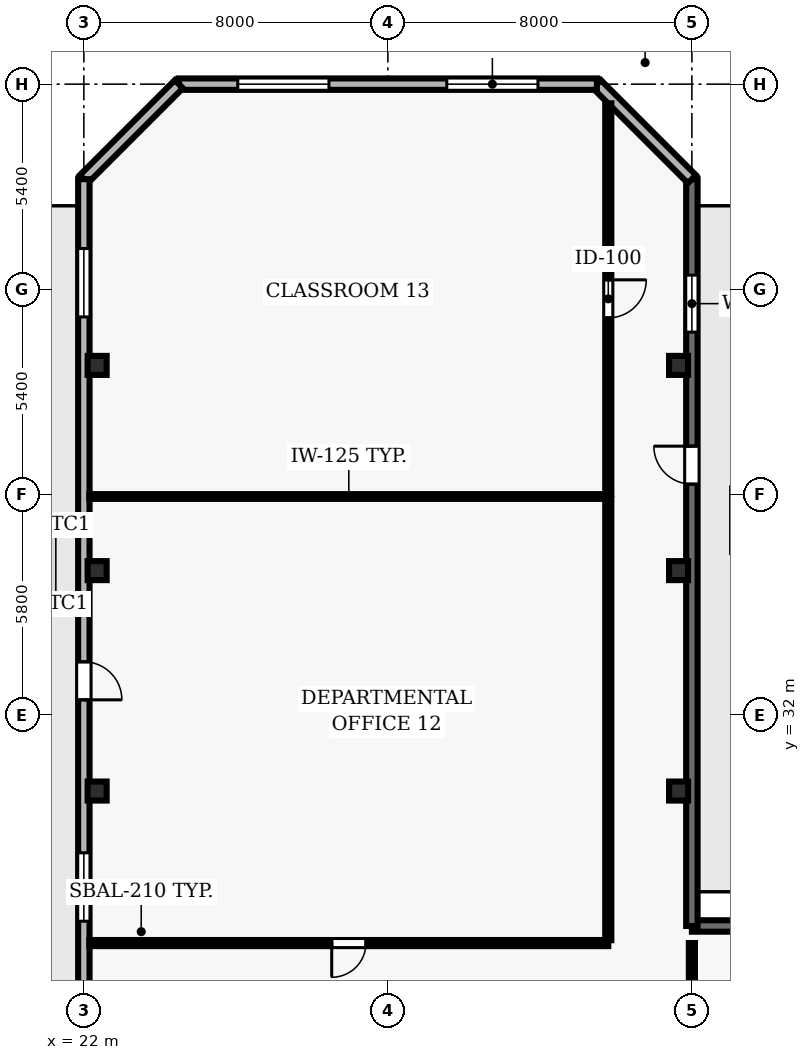
"""IFC4 building model, lengths in metres.
Left out: names, types, materials, properties, quantities, classifications, styles, units other than length and angle.
Written with IfcOpenShell. Run it as: python <this file> out.ifc"""

import sys

from ifc_helpers import new_model, si_unit, direction, frame, frame_2d, origin, origin_2d, place, context, subcontext, project, spatial, rectangle, hollow_rectangle, extrude, element, fill, save


model = new_model("IFC4")
c1 = context("Model", 3, precision=1e-05, world=origin(), true_north=direction((0.0, 1.0)))
c2 = subcontext(c1, "Body", "Model", "MODEL_VIEW")
j1 = project(units=[si_unit("LENGTHUNIT", "METRE"), si_unit("PLANEANGLEUNIT", "RADIAN")], contexts=[c1])
p1 = place(None, origin())
s1 = spatial("IfcSite", under=j1, at=p1, CompositionType="ELEMENT")
p2 = place(p1, origin())
s2 = spatial("IfcBuilding", under=s1, at=p2, CompositionType="ELEMENT")
p3 = place(p2, frame((0.0, 0.0, 138.5)))
s3 = spatial("IfcBuildingStorey", under=s2, at=p3, CompositionType="ELEMENT", Elevation=138.5)
for number, where, z_axis, x_axis in (
    (1, (22.35, 30.0, 0.0), (0.0, 0.0, 1.0), (1.0, 0.0, 0.0)),
    (2, (37.65, 30.0, 0.0), (0.0, 0.0, 1.0), (1.0, 0.0, 0.0)),
    (3, (22.35, 35.8, 0.0), (0.0, 0.0, 1.0), (1.0, 0.0, 0.0)),
    (4, (37.65, 35.8, 0.0), (0.0, 0.0, 1.0), (1.0, 0.0, 0.0)),
    (5, (22.35, 41.2, 0.0), (0.0, 0.0, 1.0), (1.0, 0.0, 0.0)),
    (6, (37.65, 41.2, 0.0), (0.0, 0.0, 1.0), (1.0, 0.0, 0.0)),
):
    element("IfcColumn", number, at=place(p3, frame(where, z_axis=z_axis, x_axis=x_axis)), inside=s3, PredefinedType="COLUMN", context=c2, shape_type="SweptSolid", body=[
        extrude(hollow_rectangle(XDim=0.5, YDim=0.5, WallThickness=0.025, at=origin_2d()), origin(), (0.0, 0.0, 1.0), 3.9),
    ])
p4 = place(p3, frame((45.499, 26.45, 0.0), z_axis=(0.0, 0.0, 1.0), x_axis=(-1.0, 0.0, 0.0)))
e7 = element("IfcWall", 7, at=p4, inside=s3, PredefinedType="SOLIDWALL", context=c2, shape_type="SweptSolid", body=[
    extrude(rectangle(XDim=7.499, YDim=0.3, at=frame_2d((3.75, 0.0))), origin(), (0.0, 0.0, 1.0), 3.69),
])
p5 = place(p4, frame((2.55, 0.0, 0.9)))
e8 = element("IfcOpeningElement", 8, at=p5, cuts=e7, PredefinedType="OPENING", context=c2, shape_type="SweptSolid", body=[
    extrude(rectangle(XDim=2.4, YDim=1.6, at=frame_2d((1.2, 0.8))), frame((0.0, 0.16, 0.0), z_axis=(0.0, -1.0, 0.0), x_axis=(1.0, 0.0, 0.0)), (0.0, 0.0, 1.0), 0.32),
])
p6 = place(p3, frame((38.0, 26.45, 0.0), z_axis=(0.0, 0.0, 1.0), x_axis=(0.0, 1.0, 0.0)))
e9 = element("IfcWall", 9, at=p6, inside=s3, PredefinedType="SOLIDWALL", context=c2, shape_type="SweptSolid", body=[
    extrude(rectangle(XDim=19.65, YDim=0.3, at=frame_2d((9.825, 0.0))), origin(), (0.0, 0.0, 1.0), 3.69),
])
p7 = place(p6, frame((11.625, 0.0, 0.0)))
e10 = element("IfcOpeningElement", 10, at=p7, cuts=e9, PredefinedType="OPENING", context=c2, shape_type="SweptSolid", body=[
    extrude(rectangle(XDim=1.0, YDim=2.2, at=frame_2d((0.5, 1.1))), frame((0.0, 0.16, 0.0), z_axis=(0.0, -1.0, 0.0), x_axis=(1.0, 0.0, 0.0)), (0.0, 0.0, 1.0), 0.32),
])
p8 = place(p6, frame((15.625, 0.0, 0.9)))
e11 = element("IfcOpeningElement", 11, at=p8, cuts=e9, PredefinedType="OPENING", context=c2, shape_type="SweptSolid", body=[
    extrude(rectangle(XDim=1.5, YDim=1.8, at=frame_2d((0.75, 0.9))), frame((0.0, 0.16, 0.0), z_axis=(0.0, -1.0, 0.0), x_axis=(1.0, 0.0, 0.0)), (0.0, 0.0, 1.0), 0.32),
])
p9 = place(p3, frame((38.0, 46.1, 0.0), z_axis=(0.0, 0.0, 1.0), x_axis=(-0.707106781187, 0.707106781187, 0.0)))
e12 = element("IfcWall", 12, at=p9, inside=s3, PredefinedType="SOLIDWALL", context=c2, shape_type="SweptSolid", body=[
    extrude(rectangle(XDim=3.536, YDim=0.3, at=frame_2d((1.768, 0.0))), origin(), (0.0, 0.0, 1.0), 3.69),
])
p10 = place(p3, frame((35.5, 48.6, 0.0), z_axis=(0.0, 0.0, 1.0), x_axis=(-1.0, 0.0, 0.0)))
e13 = element("IfcWall", 13, at=p10, inside=s3, PredefinedType="SOLIDWALL", context=c2, shape_type="SweptSolid", body=[
    extrude(rectangle(XDim=11.0, YDim=0.3, at=frame_2d((5.5, 0.0))), origin(), (0.0, 0.0, 1.0), 3.69),
])
p11 = place(p10, frame((1.55, 0.0, 0.9)))
e14 = element("IfcOpeningElement", 14, at=p11, cuts=e13, PredefinedType="OPENING", context=c2, shape_type="SweptSolid", body=[
    extrude(rectangle(XDim=2.4, YDim=1.8, at=frame_2d((1.2, 0.9))), frame((0.0, 0.16, 0.0), z_axis=(0.0, -1.0, 0.0), x_axis=(1.0, 0.0, 0.0)), (0.0, 0.0, 1.0), 0.32),
])
p12 = place(p10, frame((7.05, 0.0, 0.9)))
e15 = element("IfcOpeningElement", 15, at=p12, cuts=e13, PredefinedType="OPENING", context=c2, shape_type="SweptSolid", body=[
    extrude(rectangle(XDim=2.4, YDim=1.8, at=frame_2d((1.2, 0.9))), frame((0.0, 0.16, 0.0), z_axis=(0.0, -1.0, 0.0), x_axis=(1.0, 0.0, 0.0)), (0.0, 0.0, 1.0), 0.32),
])
p13 = place(p3, frame((24.5, 48.6, 0.0), z_axis=(0.0, 0.0, 1.0), x_axis=(-0.707106781187, -0.707106781187, 0.0)))
e16 = element("IfcWall", 16, at=p13, inside=s3, PredefinedType="SOLIDWALL", context=c2, shape_type="SweptSolid", body=[
    extrude(rectangle(XDim=3.536, YDim=0.3, at=frame_2d((1.768, 0.0))), origin(), (0.0, 0.0, 1.0), 3.69),
])
p14 = place(p3, frame((22.0, 46.1, 0.0), z_axis=(0.0, 0.0, 1.0), x_axis=(0.0, -1.0, 0.0)))
e17 = element("IfcWall", 17, at=p14, inside=s3, PredefinedType="SOLIDWALL", context=c2, shape_type="SweptSolid", body=[
    extrude(rectangle(XDim=43.6, YDim=0.3, at=frame_2d((21.8, 0.0))), origin(), (0.0, 0.0, 1.0), 3.69),
])
p15 = place(p14, frame((12.7, 0.0, 0.0)))
e18 = element("IfcOpeningElement", 18, at=p15, cuts=e17, PredefinedType="OPENING", context=c2, shape_type="SweptSolid", body=[
    extrude(rectangle(XDim=1.0, YDim=2.2, at=frame_2d((0.5, 1.1))), frame((0.0, 0.16, 0.0), z_axis=(0.0, -1.0, 0.0), x_axis=(1.0, 0.0, 0.0)), (0.0, 0.0, 1.0), 0.32),
])
p16 = place(p14, frame((1.825, 0.0, 0.9)))
e19 = element("IfcOpeningElement", 19, at=p16, cuts=e17, PredefinedType="OPENING", context=c2, shape_type="SweptSolid", body=[
    extrude(rectangle(XDim=1.8, YDim=2.2, at=frame_2d((0.9, 1.1))), frame((0.0, 0.16, 0.0), z_axis=(0.0, -1.0, 0.0), x_axis=(1.0, 0.0, 0.0)), (0.0, 0.0, 1.0), 0.32),
])
p17 = place(p14, frame((17.725, 0.0, 0.9)))
e20 = element("IfcOpeningElement", 20, at=p17, cuts=e17, PredefinedType="OPENING", context=c2, shape_type="SweptSolid", body=[
    extrude(rectangle(XDim=1.8, YDim=2.2, at=frame_2d((0.9, 1.1))), frame((0.0, 0.16, 0.0), z_axis=(0.0, -1.0, 0.0), x_axis=(1.0, 0.0, 0.0)), (0.0, 0.0, 1.0), 0.32),
])
p18 = place(p14, frame((23.625, 0.0, 0.9)))
e21 = element("IfcOpeningElement", 21, at=p18, cuts=e17, PredefinedType="OPENING", context=c2, shape_type="SweptSolid", body=[
    extrude(rectangle(XDim=1.8, YDim=2.2, at=frame_2d((0.9, 1.1))), frame((0.0, 0.16, 0.0), z_axis=(0.0, -1.0, 0.0), x_axis=(1.0, 0.0, 0.0)), (0.0, 0.0, 1.0), 0.32),
])
p19 = place(p14, frame((28.625, 0.0, 0.9)))
e22 = element("IfcOpeningElement", 22, at=p19, cuts=e17, PredefinedType="OPENING", context=c2, shape_type="SweptSolid", body=[
    extrude(rectangle(XDim=1.8, YDim=2.2, at=frame_2d((0.9, 1.1))), frame((0.0, 0.16, 0.0), z_axis=(0.0, -1.0, 0.0), x_axis=(1.0, 0.0, 0.0)), (0.0, 0.0, 1.0), 0.32),
])
p20 = place(p14, frame((34.525, 0.0, 0.9)))
e23 = element("IfcOpeningElement", 23, at=p20, cuts=e17, PredefinedType="OPENING", context=c2, shape_type="SweptSolid", body=[
    extrude(rectangle(XDim=1.8, YDim=2.2, at=frame_2d((0.9, 1.1))), frame((0.0, 0.16, 0.0), z_axis=(0.0, -1.0, 0.0), x_axis=(1.0, 0.0, 0.0)), (0.0, 0.0, 1.0), 0.32),
])
p21 = place(p3, frame((35.8, 26.0, 0.0), z_axis=(0.0, 0.0, 1.0), x_axis=(-1.0, 0.0, 0.0)))
e24 = element("IfcWall", 24, at=p21, inside=s3, PredefinedType="PARTITIONING", context=c2, shape_type="SweptSolid", body=[
    extrude(rectangle(XDim=13.655, YDim=0.16, at=frame_2d((6.828, 0.0))), origin(), (0.0, 0.0, 1.0), 3.69),
])
p22 = place(p21, frame((6.377, 0.0, 0.0)))
e25 = element("IfcOpeningElement", 25, at=p22, cuts=e24, PredefinedType="OPENING", context=c2, shape_type="SweptSolid", body=[
    extrude(rectangle(XDim=0.9, YDim=2.1, at=frame_2d((0.45, 1.05))), frame((0.0, 0.09, 0.0), z_axis=(0.0, -1.0, 0.0), x_axis=(1.0, 0.0, 0.0)), (0.0, 0.0, 1.0), 0.18),
])
p23 = place(p3, frame((35.8, 37.75, 0.0), z_axis=(0.0, 0.0, 1.0), x_axis=(-1.0, 0.0, 0.0)))
e26 = element("IfcWall", 26, at=p23, inside=s3, PredefinedType="PARTITIONING", context=c2, shape_type="SweptSolid", body=[
    extrude(rectangle(XDim=13.655, YDim=0.125, at=frame_2d((6.828, 0.0))), origin(), (0.0, 0.0, 1.0), 3.69),
])
p24 = place(p3, frame((35.8, 37.693, 0.0), z_axis=(0.0, 0.0, 1.0), x_axis=(0.0, -1.0, 0.0)))
e27 = element("IfcWall", 27, at=p24, inside=s3, PredefinedType="PARTITIONING", context=c2, shape_type="SweptSolid", body=[
    extrude(rectangle(XDim=11.618, YDim=0.16, at=frame_2d((5.809, 0.0))), origin(), (0.0, 0.0, 1.0), 3.69),
])
p25 = place(p3, frame((35.8, 48.095, 0.0), z_axis=(0.0, 0.0, 1.0), x_axis=(0.0, -1.0, 0.0)))
e28 = element("IfcWall", 28, at=p25, inside=s3, PredefinedType="PARTITIONING", context=c2, shape_type="SweptSolid", body=[
    extrude(rectangle(XDim=10.288, YDim=0.16, at=frame_2d((5.144, 0.0))), origin(), (0.0, 0.0, 1.0), 3.69),
])
p26 = place(p25, frame((4.644, 0.0, 0.0)))
e29 = element("IfcOpeningElement", 29, at=p26, cuts=e28, PredefinedType="OPENING", context=c2, shape_type="SweptSolid", body=[
    extrude(rectangle(XDim=1.0, YDim=2.1, at=frame_2d((0.5, 1.05))), frame((0.0, 0.09, 0.0), z_axis=(0.0, -1.0, 0.0), x_axis=(1.0, 0.0, 0.0)), (0.0, 0.0, 1.0), 0.18),
])
p27 = place(p3, frame((38.0, 23.85, 0.0), z_axis=(0.0, 0.0, 1.0), x_axis=(0.0, 1.0, 0.0)))
e30 = element("IfcWall", 30, at=p27, inside=s3, PredefinedType="PARTITIONING", context=c2, shape_type="SweptSolid", body=[
    extrude(rectangle(XDim=2.15, YDim=0.16, at=frame_2d((1.075, 0.0))), origin(), (0.0, 0.0, 1.0), 3.073),
])
p28 = place(p7, origin())
e31 = element("IfcDoor", 31, at=p28, inside=s3, OperationType="SINGLE_SWING_RIGHT", PredefinedType="DOOR", context=c2, shape_type="SweptSolid", body=[
    extrude(rectangle(XDim=1.0, YDim=2.2, at=frame_2d((0.5, 1.1))), frame((0.0, 0.025, 0.0), z_axis=(0.0, -1.0, 0.0), x_axis=(1.0, 0.0, 0.0)), (0.0, 0.0, 1.0), 0.05),
])
fill(e10, e31)
p29 = place(p8, origin())
e32 = element("IfcWindow", 32, at=p29, inside=s3, PartitioningType="SINGLE_PANEL", PredefinedType="WINDOW", context=c2, shape_type="SweptSolid", body=[
    extrude(rectangle(XDim=1.5, YDim=1.8, at=frame_2d((0.75, 0.9))), frame((0.0, 0.03, 0.0), z_axis=(0.0, -1.0, 0.0), x_axis=(1.0, 0.0, 0.0)), (0.0, 0.0, 1.0), 0.06),
])
fill(e11, e32)
p30 = place(p11, origin())
e33 = element("IfcWindow", 33, at=p30, inside=s3, PartitioningType="SINGLE_PANEL", PredefinedType="WINDOW", context=c2, shape_type="SweptSolid", body=[
    extrude(rectangle(XDim=2.4, YDim=1.8, at=frame_2d((1.2, 0.9))), frame((0.0, 0.03, 0.0), z_axis=(0.0, -1.0, 0.0), x_axis=(1.0, 0.0, 0.0)), (0.0, 0.0, 1.0), 0.06),
])
fill(e14, e33)
p31 = place(p12, origin())
e34 = element("IfcWindow", 34, at=p31, inside=s3, PartitioningType="SINGLE_PANEL", PredefinedType="WINDOW", context=c2, shape_type="SweptSolid", body=[
    extrude(rectangle(XDim=2.4, YDim=1.8, at=frame_2d((1.2, 0.9))), frame((0.0, 0.03, 0.0), z_axis=(0.0, -1.0, 0.0), x_axis=(1.0, 0.0, 0.0)), (0.0, 0.0, 1.0), 0.06),
])
fill(e15, e34)
p32 = place(p15, origin())
e35 = element("IfcDoor", 35, at=p32, inside=s3, OperationType="SINGLE_SWING_RIGHT", PredefinedType="DOOR", context=c2, shape_type="SweptSolid", body=[
    extrude(rectangle(XDim=1.0, YDim=2.2, at=frame_2d((0.5, 1.1))), frame((0.0, 0.025, 0.0), z_axis=(0.0, -1.0, 0.0), x_axis=(1.0, 0.0, 0.0)), (0.0, 0.0, 1.0), 0.05),
])
fill(e18, e35)
p33 = place(p16, origin())
e36 = element("IfcWindow", 36, at=p33, inside=s3, PartitioningType="SINGLE_PANEL", PredefinedType="WINDOW", context=c2, shape_type="SweptSolid", body=[
    extrude(rectangle(XDim=1.8, YDim=2.2, at=frame_2d((0.9, 1.1))), frame((0.0, 0.03, 0.0), z_axis=(0.0, -1.0, 0.0), x_axis=(1.0, 0.0, 0.0)), (0.0, 0.0, 1.0), 0.06),
])
fill(e19, e36)
p34 = place(p17, origin())
e37 = element("IfcWindow", 37, at=p34, inside=s3, PartitioningType="SINGLE_PANEL", PredefinedType="WINDOW", context=c2, shape_type="SweptSolid", body=[
    extrude(rectangle(XDim=1.8, YDim=2.2, at=frame_2d((0.9, 1.1))), frame((0.0, 0.03, 0.0), z_axis=(0.0, -1.0, 0.0), x_axis=(1.0, 0.0, 0.0)), (0.0, 0.0, 1.0), 0.06),
])
fill(e20, e37)
p35 = place(p22, origin())
e38 = element("IfcDoor", 38, at=p35, inside=s3, OperationType="SINGLE_SWING_RIGHT", PredefinedType="DOOR", context=c2, shape_type="SweptSolid", body=[
    extrude(rectangle(XDim=0.9, YDim=2.1, at=frame_2d((0.45, 1.05))), frame((0.0, 0.025, 0.0), z_axis=(0.0, -1.0, 0.0), x_axis=(1.0, 0.0, 0.0)), (0.0, 0.0, 1.0), 0.05),
])
fill(e25, e38)
p36 = place(p26, origin())
e39 = element("IfcDoor", 39, at=p36, inside=s3, OperationType="SINGLE_SWING_LEFT", PredefinedType="DOOR", context=c2, shape_type="SweptSolid", body=[
    extrude(rectangle(XDim=1.0, YDim=2.1, at=frame_2d((0.5, 1.05))), frame((0.0, 0.025, 0.0), z_axis=(0.0, -1.0, 0.0), x_axis=(1.0, 0.0, 0.0)), (0.0, 0.0, 1.0), 0.05),
])
fill(e29, e39)
save(model, sys.argv[1])
